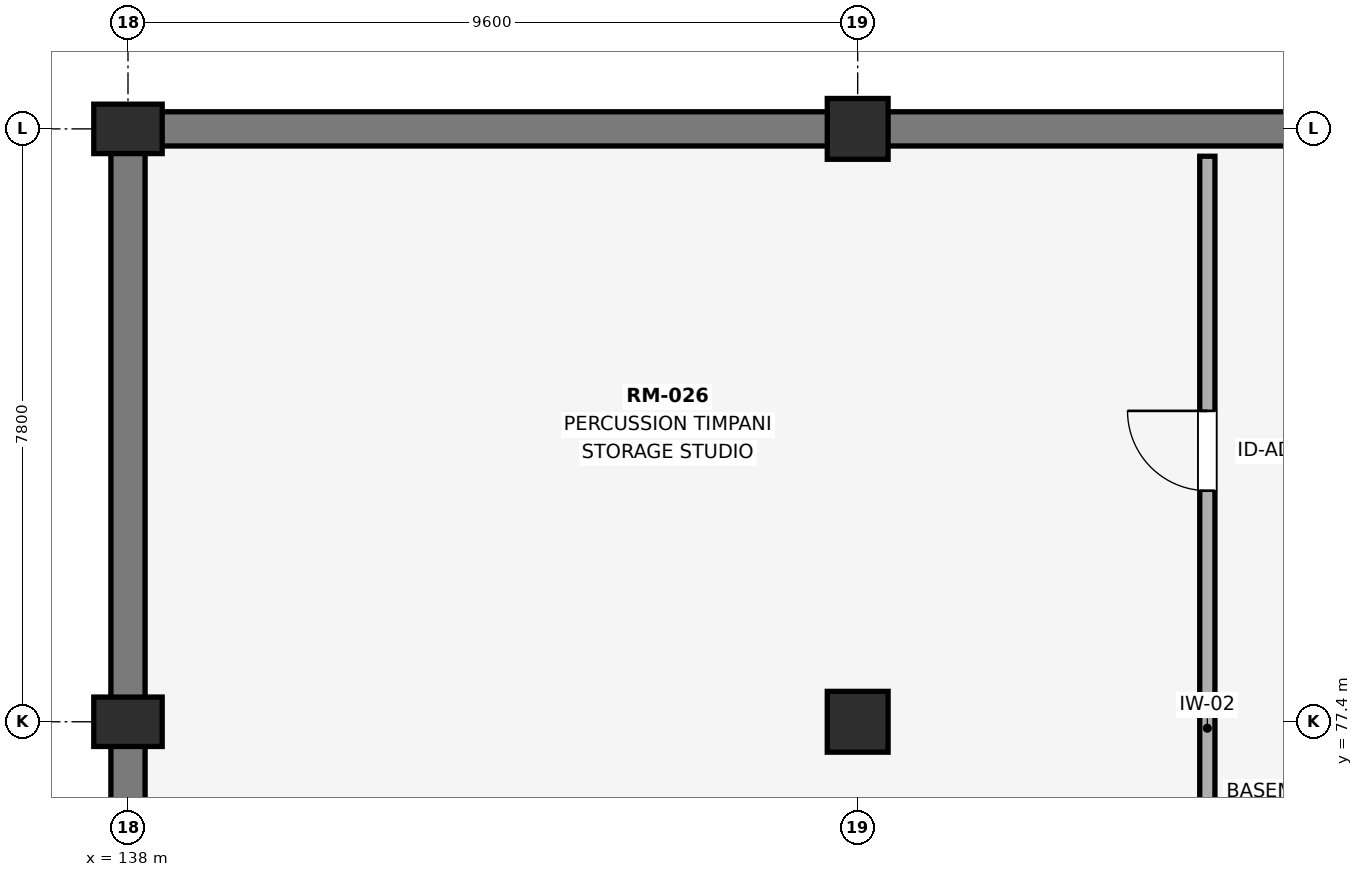
"""IFC4 building model, lengths in metres.
Left out: names, types, materials, properties, quantities, classifications, styles, units other than length and angle.
Written with IfcOpenShell. Run it as: python <this file> out.ifc"""

import sys

from ifc_helpers import new_model, si_unit, direction, frame, frame_2d, origin, origin_2d, place, context, subcontext, project, spatial, rectangle, extrude, element, fill, save


model = new_model("IFC4")
c1 = context("Model", 3, precision=1e-05, world=origin(), true_north=direction((0.0, 1.0)))
c2 = subcontext(c1, "Body", "Model", "MODEL_VIEW")
j1 = project(units=[si_unit("LENGTHUNIT", "METRE"), si_unit("PLANEANGLEUNIT", "RADIAN")], contexts=[c1])
p1 = place(None, origin())
s1 = spatial("IfcSite", under=j1, at=p1, CompositionType="ELEMENT")
p2 = place(p1, origin())
s2 = spatial("IfcBuilding", under=s1, at=p2, CompositionType="ELEMENT")
p3 = place(p2, frame((0.0, 0.0, -4.8)))
s3 = spatial("IfcBuildingStorey", under=s2, at=p3, CompositionType="ELEMENT", Elevation=-4.8)
for number, where, z_axis, x_axis in (
    (1, (138.0, 77.4, -0.45), (0.0, 0.0, 1.0), (1.0, 0.0, 0.0)),
    (2, (138.0, 85.2, -0.45), (0.0, 0.0, 1.0), (1.0, 0.0, 0.0)),
):
    element("IfcColumn", number, at=place(p3, frame(where, z_axis=z_axis, x_axis=x_axis)), inside=s3, PredefinedType="COLUMN", context=c2, shape_type="SweptSolid", body=[
        extrude(rectangle(XDim=0.9, YDim=0.65, at=origin_2d()), origin(), (0.0, 0.0, 1.0), 5.25),
    ])
for number, where, z_axis, x_axis in (
    (3, (147.6, 77.4, -0.45), (0.0, 0.0, 1.0), (1.0, 0.0, 0.0)),
    (4, (147.6, 85.2, -0.45), (0.0, 0.0, 1.0), (1.0, 0.0, 0.0)),
):
    element("IfcColumn", number, at=place(p3, frame(where, z_axis=z_axis, x_axis=x_axis)), inside=s3, PredefinedType="COLUMN", context=c2, shape_type="SweptSolid", body=[
        extrude(rectangle(XDim=0.8, YDim=0.8, at=origin_2d()), origin(), (0.0, 0.0, 1.0), 5.25),
    ])
p4 = place(p3, frame((138.0, 62.05, 0.0), z_axis=(0.0, 0.0, 1.0), x_axis=(0.0, 1.0, 0.0)))
e5 = element("IfcWall", 5, at=p4, inside=s3, PredefinedType="USERDEFINED", context=c2, shape_type="SweptSolid", body=[
    extrude(rectangle(XDim=23.15, YDim=0.45, at=frame_2d((11.575, 0.0))), origin(), (0.0, 0.0, 1.0), 4.8),
])
p5 = place(p3, frame((138.0, 85.2, 0.0), z_axis=(0.0, 0.0, 1.0), x_axis=(1.0, 0.0, 0.0)))
e6 = element("IfcWall", 6, at=p5, inside=s3, PredefinedType="USERDEFINED", context=c2, shape_type="SweptSolid", body=[
    extrude(rectangle(XDim=26.15, YDim=0.45, at=frame_2d((13.075, 0.0))), origin(), (0.0, 0.0, 1.0), 4.8),
])
p6 = place(p3, frame((152.2, 69.94, 0.0), z_axis=(0.0, 0.0, 1.0), x_axis=(0.0, 1.0, 0.0)))
e7 = element("IfcWall", 7, at=p6, inside=s3, PredefinedType="PARTITIONING", context=c2, shape_type="SweptSolid", body=[
    extrude(rectangle(XDim=14.9, YDim=0.2, at=frame_2d((7.45, 0.0))), origin(), (0.0, 0.0, 1.0), 4.49),
])
p7 = place(p6, frame((3.2, 0.0, 0.0)))
e8 = element("IfcOpeningElement", 8, at=p7, cuts=e7, PredefinedType="OPENING", context=c2, shape_type="SweptSolid", body=[
    extrude(rectangle(XDim=1.05, YDim=2.25, at=frame_2d((0.525, 1.125))), frame((0.0, 0.11, 0.0), z_axis=(0.0, -1.0, 0.0), x_axis=(1.0, 0.0, 0.0)), (0.0, 0.0, 1.0), 0.22),
])
p8 = place(p6, frame((10.5, 0.0, 0.0)))
e9 = element("IfcOpeningElement", 9, at=p8, cuts=e7, PredefinedType="OPENING", context=c2, shape_type="SweptSolid", body=[
    extrude(rectangle(XDim=1.05, YDim=2.25, at=frame_2d((0.525, 1.125))), frame((0.0, 0.11, 0.0), z_axis=(0.0, -1.0, 0.0), x_axis=(1.0, 0.0, 0.0)), (0.0, 0.0, 1.0), 0.22),
])
p9 = place(p8, origin())
e10 = element("IfcDoor", 10, at=p9, inside=s3, OperationType="SINGLE_SWING_RIGHT", PredefinedType="DOOR", context=c2, shape_type="SweptSolid", body=[
    extrude(rectangle(XDim=1.05, YDim=2.25, at=frame_2d((0.525, 1.125))), frame((0.0, 0.025, 0.0), z_axis=(0.0, -1.0, 0.0), x_axis=(1.0, 0.0, 0.0)), (0.0, 0.0, 1.0), 0.05),
])
fill(e9, e10)
save(model, sys.argv[1])
